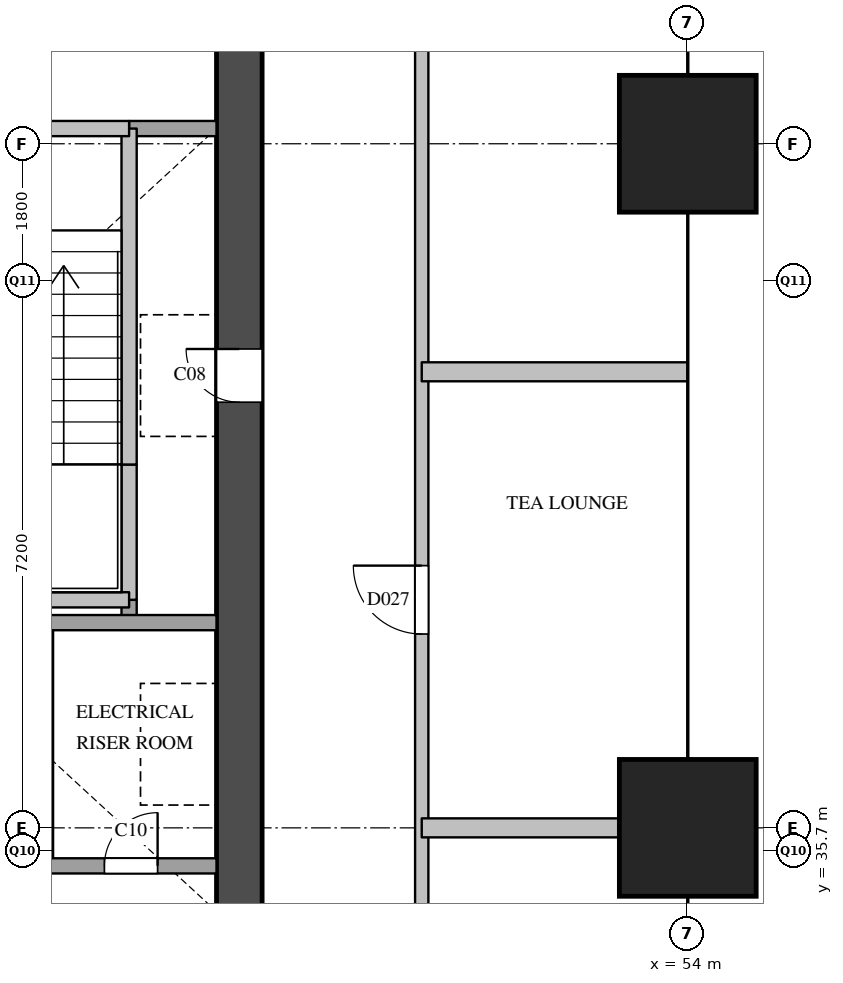
"""IFC4 building model, lengths in metres.
Left out: names, types, materials, properties, quantities, classifications, styles, units other than length and angle.
Written with IfcOpenShell. Run it as: python <this file> out.ifc"""

import sys

from ifc_helpers import new_model, si_unit, direction, frame, frame_2d, origin, origin_2d, place, context, subcontext, project, spatial, rectangle, extrude, element, fill, save


model = new_model("IFC4")
c1 = context("Model", 3, precision=1e-05, world=origin(), true_north=direction((0.0, 1.0)))
c2 = subcontext(c1, "Body", "Model", "MODEL_VIEW")
j1 = project(units=[si_unit("LENGTHUNIT", "METRE"), si_unit("PLANEANGLEUNIT", "RADIAN")], contexts=[c1])
p1 = place(None, origin())
s1 = spatial("IfcSite", under=j1, at=p1, CompositionType="ELEMENT")
p2 = place(p1, origin())
s2 = spatial("IfcBuilding", under=s1, at=p2, CompositionType="ELEMENT")
p3 = place(p2, frame((0.0, 0.0, 46.2)))
s3 = spatial("IfcBuildingStorey", under=s2, at=p3, CompositionType="ELEMENT", Elevation=46.2)
for number, where, z_axis, x_axis in (
    (1, (54.0, 36.0, 0.0), (0.0, 0.0, 1.0), (1.0, 0.0, 0.0)),
    (2, (54.0, 45.0, 0.0), (0.0, 0.0, 1.0), (1.0, 0.0, 0.0)),
):
    element("IfcColumn", number, at=place(p3, frame(where, z_axis=z_axis, x_axis=x_axis)), inside=s3, PredefinedType="COLUMN", context=c2, shape_type="SweptSolid", body=[
        extrude(rectangle(XDim=1.8, YDim=1.8, at=origin_2d()), origin(), (0.0, 0.0, 1.0), 3.8),
    ])
p4 = place(p3, frame((48.1, 29.1, 0.0), z_axis=(0.0, 0.0, 1.0), x_axis=(0.0, 1.0, 0.0)))
e3 = element("IfcWall", 3, at=p4, inside=s3, PredefinedType="SHEAR", context=c2, shape_type="SweptSolid", body=[
    extrude(rectangle(XDim=20.3, YDim=0.6, at=frame_2d((10.15, 0.0))), origin(), (0.0, 0.0, 1.0), 3.5),
])
p5 = place(p4, frame((12.5, 0.0, 0.0)))
e4 = element("IfcOpeningElement", 4, at=p5, cuts=e3, PredefinedType="OPENING", context=c2, shape_type="SweptSolid", body=[
    extrude(rectangle(XDim=0.7, YDim=2.1, at=frame_2d((0.35, 1.05))), frame((0.0, 0.31, 0.0), z_axis=(0.0, -1.0, 0.0), x_axis=(1.0, 0.0, 0.0)), (0.0, 0.0, 1.0), 0.62),
])
p6 = place(p4, frame((3.9, 0.0, 0.0)))
e5 = element("IfcOpeningElement", 5, at=p6, cuts=e3, PredefinedType="OPENING", context=c2, shape_type="SweptSolid", body=[
    extrude(rectangle(XDim=1.8, YDim=2.1, at=frame_2d((0.9, 1.05))), frame((0.0, 0.31, 0.0), z_axis=(0.0, -1.0, 0.0), x_axis=(1.0, 0.0, 0.0)), (0.0, 0.0, 1.0), 0.62),
])
p7 = place(p3, frame((45.55, 35.5, 0.0), z_axis=(0.0, 0.0, 1.0), x_axis=(0.0, 1.0, 0.0)))
e6 = element("IfcWall", 6, at=p7, inside=s3, PredefinedType="SOLIDWALL", context=c2, shape_type="SweptSolid", body=[
    extrude(rectangle(XDim=3.2, YDim=0.2, at=frame_2d((1.6, 0.0))), origin(), (0.0, 0.0, 1.0), 3.5),
])
p8 = place(p3, frame((46.65, 38.7, 0.0), z_axis=(0.0, 0.0, 1.0), x_axis=(0.0, 1.0, 0.0)))
e7 = element("IfcWall", 7, at=p8, inside=s3, PredefinedType="SOLIDWALL", context=c2, shape_type="SweptSolid", body=[
    extrude(rectangle(XDim=0.3, YDim=0.2, at=frame_2d((0.15, 0.0))), origin(), (0.0, 0.0, 1.0), 3.5),
])
p9 = place(p3, frame((46.65, 39.0, 0.0), z_axis=(0.0, 0.0, 1.0), x_axis=(0.0, 1.0, 0.0)))
e8 = element("IfcWall", 8, at=p9, inside=s3, PredefinedType="SOLIDWALL", context=c2, shape_type="SweptSolid", body=[
    extrude(rectangle(XDim=1.78, YDim=0.2, at=frame_2d((0.89, 0.0))), origin(), (0.0, 0.0, 1.0), 3.5),
])
p10 = place(p3, frame((46.65, 40.78, 0.0), z_axis=(0.0, 0.0, 1.0), x_axis=(0.0, 1.0, 0.0)))
e9 = element("IfcWall", 9, at=p10, inside=s3, PredefinedType="SOLIDWALL", context=c2, shape_type="SweptSolid", body=[
    extrude(rectangle(XDim=4.42, YDim=0.2, at=frame_2d((2.21, 0.0))), origin(), (0.0, 0.0, 1.0), 3.5),
])
p11 = place(p3, frame((43.3, 35.5, 0.0), z_axis=(0.0, 0.0, 1.0), x_axis=(1.0, 0.0, 0.0)))
e10 = element("IfcWall", 10, at=p11, inside=s3, PredefinedType="SOLIDWALL", context=c2, shape_type="SweptSolid", body=[
    extrude(rectangle(XDim=4.5, YDim=0.2, at=frame_2d((2.25, 0.0))), origin(), (0.0, 0.0, 1.0), 3.5),
])
p12 = place(p11, frame((0.525, 0.0, 0.0)))
e11 = element("IfcOpeningElement", 11, at=p12, cuts=e10, PredefinedType="OPENING", context=c2, shape_type="SweptSolid", body=[
    extrude(rectangle(XDim=1.2, YDim=2.1, at=frame_2d((0.6, 1.05))), frame((0.0, 0.11, 0.0), z_axis=(0.0, -1.0, 0.0), x_axis=(1.0, 0.0, 0.0)), (0.0, 0.0, 1.0), 0.22),
])
p13 = place(p11, frame((3.025, 0.0, 0.0)))
e12 = element("IfcOpeningElement", 12, at=p13, cuts=e10, PredefinedType="OPENING", context=c2, shape_type="SweptSolid", body=[
    extrude(rectangle(XDim=0.7, YDim=2.1, at=frame_2d((0.35, 1.05))), frame((0.0, 0.11, 0.0), z_axis=(0.0, -1.0, 0.0), x_axis=(1.0, 0.0, 0.0)), (0.0, 0.0, 1.0), 0.22),
])
p14 = place(p3, frame((43.3, 38.7, 0.0), z_axis=(0.0, 0.0, 1.0), x_axis=(1.0, 0.0, 0.0)))
e13 = element("IfcWall", 13, at=p14, inside=s3, PredefinedType="SOLIDWALL", context=c2, shape_type="SweptSolid", body=[
    extrude(rectangle(XDim=4.5, YDim=0.2, at=frame_2d((2.25, 0.0))), origin(), (0.0, 0.0, 1.0), 3.5),
])
p15 = place(p3, frame((43.4, 39.0, 0.0), z_axis=(0.0, 0.0, 1.0), x_axis=(1.0, 0.0, 0.0)))
e14 = element("IfcWall", 14, at=p15, inside=s3, PredefinedType="SOLIDWALL", context=c2, shape_type="SweptSolid", body=[
    extrude(rectangle(XDim=3.25, YDim=0.2, at=frame_2d((1.625, 0.0))), origin(), (0.0, 0.0, 1.0), 3.5),
])
p16 = place(p3, frame((46.65, 45.2, 0.0), z_axis=(0.0, 0.0, 1.0), x_axis=(1.0, 0.0, 0.0)))
e15 = element("IfcWall", 15, at=p16, inside=s3, PredefinedType="SOLIDWALL", context=c2, shape_type="SweptSolid", body=[
    extrude(rectangle(XDim=1.15, YDim=0.2, at=frame_2d((0.575, 0.0))), origin(), (0.0, 0.0, 1.0), 3.5),
])
p17 = place(p3, frame((36.6, 45.2, 0.0), z_axis=(0.0, 0.0, 1.0), x_axis=(1.0, 0.0, 0.0)))
e16 = element("IfcWall", 16, at=p17, inside=s3, PredefinedType="SOLIDWALL", context=c2, shape_type="SweptSolid", body=[
    extrude(rectangle(XDim=10.05, YDim=0.2, at=frame_2d((5.025, 0.0))), origin(), (0.0, 0.0, 1.0), 3.5),
])
p18 = place(p17, frame((1.125, 0.0, 0.0)))
e17 = element("IfcOpeningElement", 17, at=p18, cuts=e16, PredefinedType="OPENING", context=c2, shape_type="SweptSolid", body=[
    extrude(rectangle(XDim=1.1, YDim=2.1, at=frame_2d((0.55, 1.05))), frame((0.0, 0.11, 0.0), z_axis=(0.0, -1.0, 0.0), x_axis=(1.0, 0.0, 0.0)), (0.0, 0.0, 1.0), 0.22),
])
p19 = place(p17, frame((4.475, 0.0, 0.0)))
e18 = element("IfcOpeningElement", 18, at=p19, cuts=e16, PredefinedType="OPENING", context=c2, shape_type="SweptSolid", body=[
    extrude(rectangle(XDim=1.1, YDim=2.1, at=frame_2d((0.55, 1.05))), frame((0.0, 0.11, 0.0), z_axis=(0.0, -1.0, 0.0), x_axis=(1.0, 0.0, 0.0)), (0.0, 0.0, 1.0), 0.22),
])
p20 = place(p17, frame((7.825, 0.0, 0.0)))
e19 = element("IfcOpeningElement", 19, at=p20, cuts=e16, PredefinedType="OPENING", context=c2, shape_type="SweptSolid", body=[
    extrude(rectangle(XDim=1.1, YDim=2.1, at=frame_2d((0.55, 1.05))), frame((0.0, 0.11, 0.0), z_axis=(0.0, -1.0, 0.0), x_axis=(1.0, 0.0, 0.0)), (0.0, 0.0, 1.0), 0.22),
])
p21 = place(p3, frame((50.5, 26.4, 0.0), z_axis=(0.0, 0.0, 1.0), x_axis=(0.0, 1.0, 0.0)))
e20 = element("IfcWall", 20, at=p21, inside=s3, PredefinedType="PARTITIONING", context=c2, shape_type="SweptSolid", body=[
    extrude(rectangle(XDim=25.7, YDim=0.175, at=frame_2d((12.85, 0.0))), origin(), (0.0, 0.0, 1.0), 2.5),
])
p22 = place(p21, frame((4.35, 0.0, 0.0)))
e21 = element("IfcOpeningElement", 21, at=p22, cuts=e20, PredefinedType="OPENING", context=c2, shape_type="SweptSolid", body=[
    extrude(rectangle(XDim=0.9, YDim=2.1, at=frame_2d((0.45, 1.05))), frame((0.0, 0.097, 0.0), z_axis=(0.0, -1.0, 0.0), x_axis=(1.0, 0.0, 0.0)), (0.0, 0.0, 1.0), 0.195),
])
p23 = place(p21, frame((12.15, 0.0, 0.0)))
e22 = element("IfcOpeningElement", 22, at=p23, cuts=e20, PredefinedType="OPENING", context=c2, shape_type="SweptSolid", body=[
    extrude(rectangle(XDim=0.9, YDim=2.1, at=frame_2d((0.45, 1.05))), frame((0.0, 0.097, 0.0), z_axis=(0.0, -1.0, 0.0), x_axis=(1.0, 0.0, 0.0)), (0.0, 0.0, 1.0), 0.195),
])
p24 = place(p21, frame((20.2, 0.0, 0.0)))
e23 = element("IfcOpeningElement", 23, at=p24, cuts=e20, PredefinedType="OPENING", context=c2, shape_type="SweptSolid", body=[
    extrude(rectangle(XDim=0.9, YDim=2.1, at=frame_2d((0.45, 1.05))), frame((0.0, 0.097, 0.0), z_axis=(0.0, -1.0, 0.0), x_axis=(1.0, 0.0, 0.0)), (0.0, 0.0, 1.0), 0.195),
])
p25 = place(p3, frame((50.5, 36.0, 0.0), z_axis=(0.0, 0.0, 1.0), x_axis=(1.0, 0.0, 0.0)))
e24 = element("IfcWall", 24, at=p25, inside=s3, PredefinedType="PARTITIONING", context=c2, shape_type="SweptSolid", body=[
    extrude(rectangle(XDim=3.5, YDim=0.25, at=frame_2d((1.75, 0.0))), origin(), (0.0, 0.0, 1.0), 3.5),
])
p26 = place(p3, frame((50.5, 42.0, 0.0), z_axis=(0.0, 0.0, 1.0), x_axis=(1.0, 0.0, 0.0)))
e25 = element("IfcWall", 25, at=p26, inside=s3, PredefinedType="PARTITIONING", context=c2, shape_type="SweptSolid", body=[
    extrude(rectangle(XDim=3.5, YDim=0.25, at=frame_2d((1.75, 0.0))), origin(), (0.0, 0.0, 1.0), 2.5),
])
p27 = place(p5, origin())
e26 = element("IfcDoor", 26, at=p27, inside=s3, OperationType="SINGLE_SWING_RIGHT", PredefinedType="DOOR", context=c2, shape_type="SweptSolid", body=[
    extrude(rectangle(XDim=0.7, YDim=2.1, at=frame_2d((0.35, 1.05))), frame((0.0, 0.025, 0.0), z_axis=(0.0, -1.0, 0.0), x_axis=(1.0, 0.0, 0.0)), (0.0, 0.0, 1.0), 0.05),
])
fill(e4, e26)
p28 = place(p13, origin())
e27 = element("IfcDoor", 27, at=p28, inside=s3, OperationType="SINGLE_SWING_RIGHT", PredefinedType="DOOR", context=c2, shape_type="SweptSolid", body=[
    extrude(rectangle(XDim=0.7, YDim=2.1, at=frame_2d((0.35, 1.05))), frame((0.0, 0.025, 0.0), z_axis=(0.0, -1.0, 0.0), x_axis=(1.0, 0.0, 0.0)), (0.0, 0.0, 1.0), 0.05),
])
fill(e12, e27)
p29 = place(p23, origin())
e28 = element("IfcDoor", 28, at=p29, inside=s3, OperationType="SINGLE_SWING_RIGHT", PredefinedType="DOOR", context=c2, shape_type="SweptSolid", body=[
    extrude(rectangle(XDim=0.9, YDim=2.1, at=frame_2d((0.45, 1.05))), frame((0.0, 0.025, 0.0), z_axis=(0.0, -1.0, 0.0), x_axis=(1.0, 0.0, 0.0)), (0.0, 0.0, 1.0), 0.05),
])
fill(e22, e28)
save(model, sys.argv[1])
